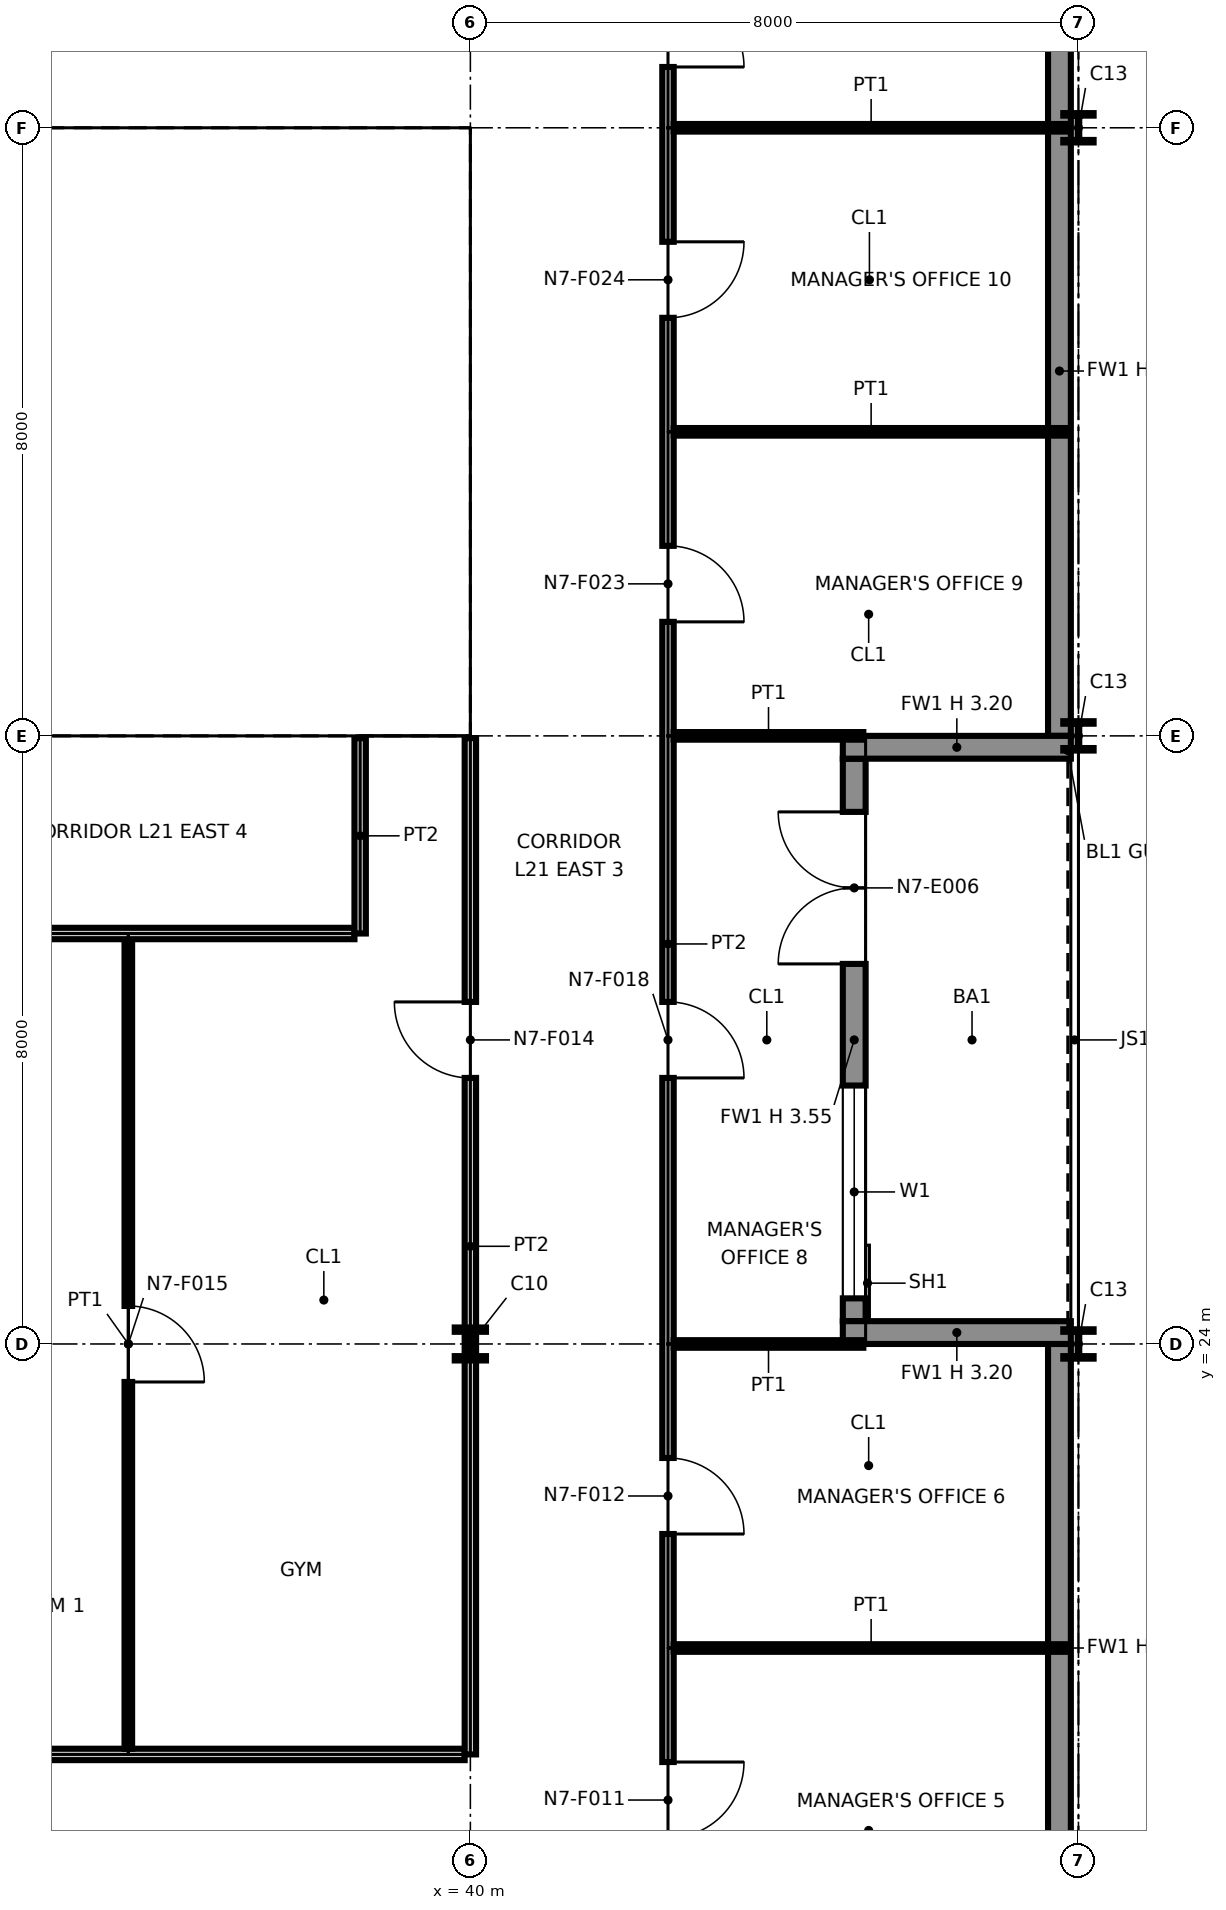
"""IFC4 building model, lengths in metres.
Left out: names, types, materials, properties, quantities, classifications, styles, units other than length and angle.
Written with IfcOpenShell. Run it as: python <this file> out.ifc"""

import sys

from ifc_helpers import new_model, si_unit, direction, frame, frame_2d, origin, origin_2d, place, context, subcontext, project, spatial, polyline, rectangle, i_section, outline, extrude, element, fill, save


model = new_model("IFC4")
c1 = context("Model", 3, precision=1e-05, world=origin(), true_north=direction((0.0, 1.0)))
c2 = subcontext(c1, "Body", "Model", "MODEL_VIEW")
j1 = project(units=[si_unit("LENGTHUNIT", "METRE"), si_unit("PLANEANGLEUNIT", "RADIAN")], contexts=[c1])
p1 = place(None, origin())
s1 = spatial("IfcSite", under=j1, at=p1, CompositionType="ELEMENT")
p2 = place(p1, origin())
s2 = spatial("IfcBuilding", under=s1, at=p2, CompositionType="ELEMENT")
p3 = place(p2, frame((0.0, 0.0, 109.6)))
s3 = spatial("IfcBuildingStorey", under=s2, at=p3, CompositionType="ELEMENT", Elevation=109.6)
p4 = place(p3, frame((40.0, 24.0, 0.0), z_axis=(0.0, 0.0, 1.0), x_axis=(1.0, 0.0, 0.0)))
e1 = element("IfcColumn", 1, at=p4, inside=s3, PredefinedType="COLUMN", context=c2, shape_type="SweptSolid", body=[
    extrude(i_section(OverallWidth=0.411, OverallDepth=0.434, WebThickness=0.036, FlangeThickness=0.057, at=origin_2d()), origin(), (0.0, 0.0, 1.0), 4.15),
])
for number, where, z_axis, x_axis in (
    (2, (40.0, 32.0, 0.0), (0.0, 0.0, 1.0), (1.0, 0.0, 0.0)),
    (3, (40.0, 40.0, 0.0), (0.0, 0.0, 1.0), (1.0, 0.0, 0.0)),
):
    element("IfcColumn", number, at=place(p3, frame(where, z_axis=z_axis, x_axis=x_axis)), inside=s3, PredefinedType="COLUMN", context=c2, shape_type="SweptSolid", body=[
        extrude(i_section(OverallWidth=0.257, OverallDepth=0.363, WebThickness=0.013, FlangeThickness=0.022, at=origin_2d()), origin(), (0.0, 0.0, 1.0), 4.15),
    ])
for number, where, z_axis, x_axis in (
    (4, (48.0, 24.0, 0.0), (0.0, 0.0, 1.0), (1.0, 0.0, 0.0)),
    (5, (48.0, 32.0, 0.0), (0.0, 0.0, 1.0), (1.0, 0.0, 0.0)),
    (6, (48.0, 40.0, 0.0), (0.0, 0.0, 1.0), (1.0, 0.0, 0.0)),
):
    element("IfcColumn", number, at=place(p3, frame(where, z_axis=z_axis, x_axis=x_axis)), inside=s3, PredefinedType="COLUMN", context=c2, shape_type="SweptSolid", body=[
        extrude(i_section(OverallWidth=0.399, OverallDepth=0.386, WebThickness=0.021, FlangeThickness=0.033, at=origin_2d()), origin(), (0.0, 0.0, 1.0), 4.15),
    ])
p5 = place(p3, frame((47.75, 16.0, 0.0), z_axis=(0.0, 0.0, 1.0), x_axis=(0.0, 1.0, 0.0)))
e7 = element("IfcWall", 7, at=p5, inside=s3, PredefinedType="SOLIDWALL", context=c2, shape_type="SweptSolid", body=[
    extrude(rectangle(XDim=8.0, YDim=0.3, at=frame_2d((4.0, 0.0))), origin(), (0.0, 0.0, 1.0), 3.199),
])
p6 = place(p3, frame((45.05, 24.3, 0.0), z_axis=(0.0, 0.0, 1.0), x_axis=(0.0, 1.0, 0.0)))
e8 = element("IfcWall", 8, at=p6, inside=s3, PredefinedType="SOLIDWALL", context=c2, shape_type="SweptSolid", body=[
    extrude(rectangle(XDim=7.4, YDim=0.3, at=frame_2d((3.7, 0.0))), origin(), (0.0, 0.0, 1.0), 3.547),
])
p7 = place(p6, frame((0.3, 0.0, 0.9)))
e9 = element("IfcOpeningElement", 9, at=p7, cuts=e8, PredefinedType="OPENING", context=c2, shape_type="SweptSolid", body=[
    extrude(rectangle(XDim=2.8, YDim=2.2, at=frame_2d((1.4, 1.1))), frame((0.0, 0.16, 0.0), z_axis=(0.0, -1.0, 0.0), x_axis=(1.0, 0.0, 0.0)), (0.0, 0.0, 1.0), 0.32),
])
p8 = place(p6, frame((4.7, 0.0, 0.0)))
e10 = element("IfcOpeningElement", 10, at=p8, cuts=e8, PredefinedType="OPENING", context=c2, shape_type="SweptSolid", body=[
    extrude(rectangle(XDim=2.0, YDim=2.4, at=frame_2d((1.0, 1.2))), frame((0.0, 0.16, 0.0), z_axis=(0.0, -1.0, 0.0), x_axis=(1.0, 0.0, 0.0)), (0.0, 0.0, 1.0), 0.32),
])
for number, where, z_axis, x_axis in (
    (11, (47.9, 24.15, 0.0), (0.0, 0.0, 1.0), (-1.0, 0.0, 0.0)),
    (12, (47.9, 31.85, 0.0), (0.0, 0.0, 1.0), (-1.0, 0.0, 0.0)),
):
    element("IfcWall", number, at=place(p3, frame(where, z_axis=z_axis, x_axis=x_axis)), inside=s3, PredefinedType="SOLIDWALL", context=c2, shape_type="SweptSolid", body=[
        extrude(rectangle(XDim=3.0, YDim=0.3, at=frame_2d((1.5, 0.0))), origin(), (0.0, 0.0, 1.0), 3.199),
    ])
p9 = place(p3, frame((47.75, 32.0, 0.0), z_axis=(0.0, 0.0, 1.0), x_axis=(0.0, 1.0, 0.0)))
e13 = element("IfcWall", 13, at=p9, inside=s3, PredefinedType="SOLIDWALL", context=c2, shape_type="SweptSolid", body=[
    extrude(rectangle(XDim=9.6, YDim=0.3, at=frame_2d((4.8, 0.0))), origin(), (0.0, 0.0, 1.0), 3.199),
])
p10 = place(p3, frame((24.65, 32.75, 0.0), z_axis=(0.0, 0.0, 1.0), x_axis=(1.0, 0.0, 0.0)))
e14 = element("IfcWall", 14, at=p10, inside=s3, PredefinedType="PARTITIONING", context=c2, shape_type="SweptSolid", body=[
    extrude(outline(polyline([(0.0, 0.0), (14.7, 0.0), (14.7, 4.15), (7.489, 4.15), (7.488, 3.382), (7.212, 3.382), (7.211, 4.15), (0.0, 4.15), (0.0, 0.0)])), frame((0.0, 0.1, 0.0), z_axis=(0.0, -1.0, 0.0), x_axis=(1.0, 0.0, 0.0)), (0.0, 0.0, 1.0), 0.2),
])
p11 = place(p10, frame((4.1, 0.0, 0.0)))
e15 = element("IfcOpeningElement", 15, at=p11, cuts=e14, PredefinedType="OPENING", context=c2, shape_type="SweptSolid", body=[
    extrude(rectangle(XDim=1.8, YDim=2.1, at=frame_2d((0.9, 1.05))), frame((0.0, 0.11, 0.0), z_axis=(0.0, -1.0, 0.0), x_axis=(1.0, 0.0, 0.0)), (0.0, 0.0, 1.0), 0.22),
])
p12 = place(p10, frame((8.55, 0.0, 0.0)))
e16 = element("IfcOpeningElement", 16, at=p12, cuts=e14, PredefinedType="OPENING", context=c2, shape_type="SweptSolid", body=[
    extrude(rectangle(XDim=1.4, YDim=2.1, at=frame_2d((0.7, 1.05))), frame((0.0, 0.11, 0.0), z_axis=(0.0, -1.0, 0.0), x_axis=(1.0, 0.0, 0.0)), (0.0, 0.0, 1.0), 0.22),
])
p13 = place(p10, frame((12.0, 0.0, 0.0)))
e17 = element("IfcOpeningElement", 17, at=p13, cuts=e14, PredefinedType="OPENING", context=c2, shape_type="SweptSolid", body=[
    extrude(rectangle(XDim=1.4, YDim=2.1, at=frame_2d((0.7, 1.05))), frame((0.0, 0.11, 0.0), z_axis=(0.0, -1.0, 0.0), x_axis=(1.0, 0.0, 0.0)), (0.0, 0.0, 1.0), 0.22),
])
p14 = place(p3, frame((24.65, 39.25, 0.0), z_axis=(0.0, 0.0, 1.0), x_axis=(1.0, 0.0, 0.0)))
e18 = element("IfcWall", 18, at=p14, inside=s3, PredefinedType="PARTITIONING", context=c2, shape_type="SweptSolid", body=[
    extrude(outline(polyline([(0.0, 0.0), (14.7, 0.0), (14.7, 4.15), (7.489, 4.15), (7.488, 3.382), (7.212, 3.382), (7.211, 4.15), (0.0, 4.15), (0.0, 0.0)])), frame((0.0, 0.1, 0.0), z_axis=(0.0, -1.0, 0.0), x_axis=(1.0, 0.0, 0.0)), (0.0, 0.0, 1.0), 0.2),
])
for number, where, z_axis, x_axis in (
    (19, (35.6, 32.85, 0.0), (0.0, 0.0, 1.0), (0.0, 1.0, 0.0)),
    (20, (39.25, 32.85, 0.0), (0.0, 0.0, 1.0), (0.0, 1.0, 0.0)),
):
    element("IfcWall", number, at=place(p3, frame(where, z_axis=z_axis, x_axis=x_axis)), inside=s3, PredefinedType="PARTITIONING", context=c2, shape_type="SweptSolid", body=[
        extrude(rectangle(XDim=6.3, YDim=0.2, at=frame_2d((3.15, 0.0))), origin(), (0.0, 0.0, 1.0), 4.15),
    ])
p15 = place(p3, frame((42.6, 16.0, 0.0), z_axis=(0.0, 0.0, 1.0), x_axis=(0.0, 1.0, 0.0)))
e21 = element("IfcWall", 21, at=p15, inside=s3, PredefinedType="PARTITIONING", context=c2, shape_type="SweptSolid", body=[
    extrude(rectangle(XDim=26.525, YDim=0.15, at=frame_2d((13.262, 0.0))), origin(), (0.0, 0.0, 1.0), 3.194),
])
p16 = place(p15, frame((2.5, 0.0, 0.0), z_axis=(0.0, 0.0, 1.0), x_axis=(-1.0, 0.0, 0.0)))
e22 = element("IfcOpeningElement", 22, at=p16, cuts=e21, PredefinedType="OPENING", context=c2, shape_type="SweptSolid", body=[
    extrude(rectangle(XDim=1.0, YDim=2.1, at=frame_2d((0.5, 1.05))), frame((0.0, 0.085, 0.0), z_axis=(0.0, -1.0, 0.0), x_axis=(1.0, 0.0, 0.0)), (0.0, 0.0, 1.0), 0.17),
])
p17 = place(p15, frame((6.5, 0.0, 0.0), z_axis=(0.0, 0.0, 1.0), x_axis=(-1.0, 0.0, 0.0)))
e23 = element("IfcOpeningElement", 23, at=p17, cuts=e21, PredefinedType="OPENING", context=c2, shape_type="SweptSolid", body=[
    extrude(rectangle(XDim=1.0, YDim=2.1, at=frame_2d((0.5, 1.05))), frame((0.0, 0.085, 0.0), z_axis=(0.0, -1.0, 0.0), x_axis=(1.0, 0.0, 0.0)), (0.0, 0.0, 1.0), 0.17),
])
p18 = place(p15, frame((12.5, 0.0, 0.0), z_axis=(0.0, 0.0, 1.0), x_axis=(-1.0, 0.0, 0.0)))
e24 = element("IfcOpeningElement", 24, at=p18, cuts=e21, PredefinedType="OPENING", context=c2, shape_type="SweptSolid", body=[
    extrude(rectangle(XDim=1.0, YDim=2.1, at=frame_2d((0.5, 1.05))), frame((0.0, 0.085, 0.0), z_axis=(0.0, -1.0, 0.0), x_axis=(1.0, 0.0, 0.0)), (0.0, 0.0, 1.0), 0.17),
])
p19 = place(p15, frame((18.5, 0.0, 0.0), z_axis=(0.0, 0.0, 1.0), x_axis=(-1.0, 0.0, 0.0)))
e25 = element("IfcOpeningElement", 25, at=p19, cuts=e21, PredefinedType="OPENING", context=c2, shape_type="SweptSolid", body=[
    extrude(rectangle(XDim=1.0, YDim=2.1, at=frame_2d((0.5, 1.05))), frame((0.0, 0.085, 0.0), z_axis=(0.0, -1.0, 0.0), x_axis=(1.0, 0.0, 0.0)), (0.0, 0.0, 1.0), 0.17),
])
p20 = place(p15, frame((22.5, 0.0, 0.0), z_axis=(0.0, 0.0, 1.0), x_axis=(-1.0, 0.0, 0.0)))
e26 = element("IfcOpeningElement", 26, at=p20, cuts=e21, PredefinedType="OPENING", context=c2, shape_type="SweptSolid", body=[
    extrude(rectangle(XDim=1.0, YDim=2.1, at=frame_2d((0.5, 1.05))), frame((0.0, 0.085, 0.0), z_axis=(0.0, -1.0, 0.0), x_axis=(1.0, 0.0, 0.0)), (0.0, 0.0, 1.0), 0.17),
])
p21 = place(p15, frame((25.8, 0.0, 0.0), z_axis=(0.0, 0.0, 1.0), x_axis=(-1.0, 0.0, 0.0)))
e27 = element("IfcOpeningElement", 27, at=p21, cuts=e21, PredefinedType="OPENING", context=c2, shape_type="SweptSolid", body=[
    extrude(rectangle(XDim=1.0, YDim=2.1, at=frame_2d((0.5, 1.05))), frame((0.0, 0.085, 0.0), z_axis=(0.0, -1.0, 0.0), x_axis=(1.0, 0.0, 0.0)), (0.0, 0.0, 1.0), 0.17),
])
p22 = place(p3, frame((26.675, 18.6, 0.0), z_axis=(0.0, 0.0, 1.0), x_axis=(1.0, 0.0, 0.0)))
e28 = element("IfcWall", 28, at=p22, inside=s3, PredefinedType="PARTITIONING", context=c2, shape_type="SweptSolid", body=[
    extrude(rectangle(XDim=13.25, YDim=0.15, at=frame_2d((6.625, 0.0))), origin(), (0.0, 0.0, 1.0), 3.194),
])
p23 = place(p22, frame((2.325, 0.0, 0.0)))
e29 = element("IfcOpeningElement", 29, at=p23, cuts=e28, PredefinedType="OPENING", context=c2, shape_type="SweptSolid", body=[
    extrude(rectangle(XDim=1.0, YDim=2.1, at=frame_2d((0.5, 1.05))), frame((0.0, 0.085, 0.0), z_axis=(0.0, -1.0, 0.0), x_axis=(1.0, 0.0, 0.0)), (0.0, 0.0, 1.0), 0.17),
])
p24 = place(p3, frame((35.5, 18.675, 0.0), z_axis=(0.0, 0.0, 1.0), x_axis=(0.0, 1.0, 0.0)))
e30 = element("IfcWall", 30, at=p24, inside=s3, PredefinedType="PARTITIONING", context=c2, shape_type="SweptSolid", body=[
    extrude(rectangle(XDim=10.65, YDim=0.1, at=frame_2d((5.325, 0.0))), origin(), (0.0, 0.0, 1.0), 3.194),
])
p25 = place(p24, frame((5.825, 0.0, 0.0), z_axis=(0.0, 0.0, 1.0), x_axis=(-1.0, 0.0, 0.0)))
e31 = element("IfcOpeningElement", 31, at=p25, cuts=e30, PredefinedType="OPENING", context=c2, shape_type="SweptSolid", body=[
    extrude(rectangle(XDim=1.0, YDim=2.1, at=frame_2d((0.5, 1.05))), frame((0.0, 0.06, 0.0), z_axis=(0.0, -1.0, 0.0), x_axis=(1.0, 0.0, 0.0)), (0.0, 0.0, 1.0), 0.12),
])
p26 = place(p3, frame((40.0, 18.6, 0.0), z_axis=(0.0, 0.0, 1.0), x_axis=(0.0, 1.0, 0.0)))
e32 = element("IfcWall", 32, at=p26, inside=s3, PredefinedType="PARTITIONING", context=c2, shape_type="SweptSolid", body=[
    extrude(rectangle(XDim=13.37, YDim=0.15, at=frame_2d((6.685, 0.0))), origin(), (0.0, 0.0, 1.0), 3.194),
])
p27 = place(p26, frame((8.9, 0.0, 0.0)))
e33 = element("IfcOpeningElement", 33, at=p27, cuts=e32, PredefinedType="OPENING", context=c2, shape_type="SweptSolid", body=[
    extrude(rectangle(XDim=1.0, YDim=2.1, at=frame_2d((0.5, 1.05))), frame((0.0, 0.085, 0.0), z_axis=(0.0, -1.0, 0.0), x_axis=(1.0, 0.0, 0.0)), (0.0, 0.0, 1.0), 0.17),
])
p28 = place(p3, frame((42.675, 20.0, 0.0), z_axis=(0.0, 0.0, 1.0), x_axis=(1.0, 0.0, 0.0)))
e34 = element("IfcWall", 34, at=p28, inside=s3, PredefinedType="PARTITIONING", context=c2, shape_type="SweptSolid", body=[
    extrude(rectangle(XDim=5.195, YDim=0.1, at=frame_2d((2.598, 0.0))), origin(), (0.0, 0.0, 1.0), 3.194),
])
p29 = place(p3, frame((42.675, 24.0, 0.0), z_axis=(0.0, 0.0, 1.0), x_axis=(1.0, 0.0, 0.0)))
e35 = element("IfcWall", 35, at=p29, inside=s3, PredefinedType="PARTITIONING", context=c2, shape_type="SweptSolid", body=[
    extrude(rectangle(XDim=2.495, YDim=0.1, at=frame_2d((1.248, 0.0))), origin(), (0.0, 0.0, 1.0), 3.194),
])
p30 = place(p3, frame((28.325, 29.4, 0.0), z_axis=(0.0, 0.0, 1.0), x_axis=(1.0, 0.0, 0.0)))
e36 = element("IfcWall", 36, at=p30, inside=s3, PredefinedType="PARTITIONING", context=c2, shape_type="SweptSolid", body=[
    extrude(rectangle(XDim=10.15, YDim=0.15, at=frame_2d((5.075, 0.0))), origin(), (0.0, 0.0, 1.0), 3.194),
])
p31 = place(p3, frame((38.55, 29.4, 0.0), z_axis=(0.0, 0.0, 1.0), x_axis=(0.0, 1.0, 0.0)))
e37 = element("IfcWall", 37, at=p31, inside=s3, PredefinedType="PARTITIONING", context=c2, shape_type="SweptSolid", body=[
    extrude(rectangle(XDim=2.57, YDim=0.15, at=frame_2d((1.285, 0.0))), origin(), (0.0, 0.0, 1.0), 3.194),
])
p32 = place(p3, frame((42.675, 32.0, 0.0), z_axis=(0.0, 0.0, 1.0), x_axis=(1.0, 0.0, 0.0)))
e38 = element("IfcWall", 38, at=p32, inside=s3, PredefinedType="PARTITIONING", context=c2, shape_type="SweptSolid", body=[
    extrude(rectangle(XDim=2.495, YDim=0.1, at=frame_2d((1.248, 0.0))), origin(), (0.0, 0.0, 1.0), 3.194),
])
for number, where, z_axis, x_axis in (
    (39, (42.675, 36.0, 0.0), (0.0, 0.0, 1.0), (1.0, 0.0, 0.0)),
    (40, (42.675, 40.0, 0.0), (0.0, 0.0, 1.0), (1.0, 0.0, 0.0)),
):
    element("IfcWall", number, at=place(p3, frame(where, z_axis=z_axis, x_axis=x_axis)), inside=s3, PredefinedType="PARTITIONING", context=c2, shape_type="SweptSolid", body=[
        extrude(rectangle(XDim=5.195, YDim=0.1, at=frame_2d((2.598, 0.0))), origin(), (0.0, 0.0, 1.0), 3.194),
    ])
p33 = place(p7, origin())
e41 = element("IfcWindow", 41, at=p33, inside=s3, PartitioningType="SINGLE_PANEL", PredefinedType="WINDOW", context=c2, shape_type="SweptSolid", body=[
    extrude(rectangle(XDim=2.8, YDim=2.2, at=frame_2d((1.4, 1.1))), frame((0.0, 0.03, 0.0), z_axis=(0.0, -1.0, 0.0), x_axis=(1.0, 0.0, 0.0)), (0.0, 0.0, 1.0), 0.06),
])
fill(e9, e41)
p34 = place(p8, origin())
e42 = element("IfcDoor", 42, at=p34, inside=s3, OperationType="DOUBLE_DOOR_SINGLE_SWING", PredefinedType="DOOR", context=c2, shape_type="SweptSolid", body=[
    extrude(rectangle(XDim=2.0, YDim=2.4, at=frame_2d((1.0, 1.2))), frame((0.0, 0.025, 0.0), z_axis=(0.0, -1.0, 0.0), x_axis=(1.0, 0.0, 0.0)), (0.0, 0.0, 1.0), 0.05),
])
fill(e10, e42)
p35 = place(p12, origin())
e43 = element("IfcDoor", 43, at=p35, inside=s3, OperationType="DOUBLE_DOOR_SINGLE_SWING", PredefinedType="NOTDEFINED", context=c2, shape_type="SweptSolid", body=[
    extrude(rectangle(XDim=1.4, YDim=2.1, at=frame_2d((0.7, 1.05))), frame((0.0, 0.025, 0.0), z_axis=(0.0, -1.0, 0.0), x_axis=(1.0, 0.0, 0.0)), (0.0, 0.0, 1.0), 0.05),
])
fill(e16, e43)
p36 = place(p13, origin())
e44 = element("IfcDoor", 44, at=p36, inside=s3, OperationType="DOUBLE_DOOR_SINGLE_SWING", PredefinedType="NOTDEFINED", context=c2, shape_type="SweptSolid", body=[
    extrude(rectangle(XDim=1.4, YDim=2.1, at=frame_2d((0.7, 1.05))), frame((0.0, 0.025, 0.0), z_axis=(0.0, -1.0, 0.0), x_axis=(1.0, 0.0, 0.0)), (0.0, 0.0, 1.0), 0.05),
])
fill(e17, e44)
p37 = place(p16, origin())
e45 = element("IfcDoor", 45, at=p37, inside=s3, OperationType="SINGLE_SWING_LEFT", PredefinedType="DOOR", context=c2, shape_type="SweptSolid", body=[
    extrude(rectangle(XDim=1.0, YDim=2.1, at=frame_2d((0.5, 1.05))), frame((0.0, 0.025, 0.0), z_axis=(0.0, -1.0, 0.0), x_axis=(1.0, 0.0, 0.0)), (0.0, 0.0, 1.0), 0.05),
])
fill(e22, e45)
p38 = place(p17, origin())
e46 = element("IfcDoor", 46, at=p38, inside=s3, OperationType="SINGLE_SWING_RIGHT", PredefinedType="DOOR", context=c2, shape_type="SweptSolid", body=[
    extrude(rectangle(XDim=1.0, YDim=2.1, at=frame_2d((0.5, 1.05))), frame((0.0, 0.025, 0.0), z_axis=(0.0, -1.0, 0.0), x_axis=(1.0, 0.0, 0.0)), (0.0, 0.0, 1.0), 0.05),
])
fill(e23, e46)
p39 = place(p27, origin())
e47 = element("IfcDoor", 47, at=p39, inside=s3, OperationType="SINGLE_SWING_RIGHT", PredefinedType="DOOR", context=c2, shape_type="SweptSolid", body=[
    extrude(rectangle(XDim=1.0, YDim=2.1, at=frame_2d((0.5, 1.05))), frame((0.0, 0.025, 0.0), z_axis=(0.0, -1.0, 0.0), x_axis=(1.0, 0.0, 0.0)), (0.0, 0.0, 1.0), 0.05),
])
fill(e33, e47)
p40 = place(p25, origin())
e48 = element("IfcDoor", 48, at=p40, inside=s3, OperationType="SINGLE_SWING_RIGHT", PredefinedType="DOOR", context=c2, shape_type="SweptSolid", body=[
    extrude(rectangle(XDim=1.0, YDim=2.1, at=frame_2d((0.5, 1.05))), frame((0.0, 0.025, 0.0), z_axis=(0.0, -1.0, 0.0), x_axis=(1.0, 0.0, 0.0)), (0.0, 0.0, 1.0), 0.05),
])
fill(e31, e48)
p41 = place(p18, origin())
e49 = element("IfcDoor", 49, at=p41, inside=s3, OperationType="SINGLE_SWING_RIGHT", PredefinedType="DOOR", context=c2, shape_type="SweptSolid", body=[
    extrude(rectangle(XDim=1.0, YDim=2.1, at=frame_2d((0.5, 1.05))), frame((0.0, 0.025, 0.0), z_axis=(0.0, -1.0, 0.0), x_axis=(1.0, 0.0, 0.0)), (0.0, 0.0, 1.0), 0.05),
])
fill(e24, e49)
p42 = place(p19, origin())
e50 = element("IfcDoor", 50, at=p42, inside=s3, OperationType="SINGLE_SWING_RIGHT", PredefinedType="DOOR", context=c2, shape_type="SweptSolid", body=[
    extrude(rectangle(XDim=1.0, YDim=2.1, at=frame_2d((0.5, 1.05))), frame((0.0, 0.025, 0.0), z_axis=(0.0, -1.0, 0.0), x_axis=(1.0, 0.0, 0.0)), (0.0, 0.0, 1.0), 0.05),
])
fill(e25, e50)
p43 = place(p20, origin())
e51 = element("IfcDoor", 51, at=p43, inside=s3, OperationType="SINGLE_SWING_LEFT", PredefinedType="DOOR", context=c2, shape_type="SweptSolid", body=[
    extrude(rectangle(XDim=1.0, YDim=2.1, at=frame_2d((0.5, 1.05))), frame((0.0, 0.025, 0.0), z_axis=(0.0, -1.0, 0.0), x_axis=(1.0, 0.0, 0.0)), (0.0, 0.0, 1.0), 0.05),
])
fill(e26, e51)
p44 = place(p21, origin())
e52 = element("IfcDoor", 52, at=p44, inside=s3, OperationType="SINGLE_SWING_RIGHT", PredefinedType="DOOR", context=c2, shape_type="SweptSolid", body=[
    extrude(rectangle(XDim=1.0, YDim=2.1, at=frame_2d((0.5, 1.05))), frame((0.0, 0.025, 0.0), z_axis=(0.0, -1.0, 0.0), x_axis=(1.0, 0.0, 0.0)), (0.0, 0.0, 1.0), 0.05),
])
fill(e27, e52)
save(model, sys.argv[1])
